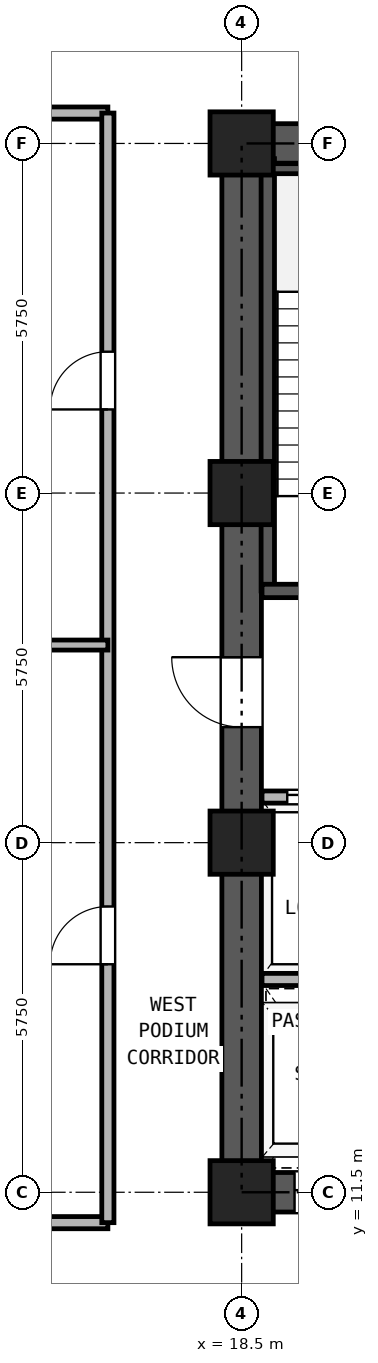
"""IFC4 building model, lengths in metres.
Left out: names, types, materials, properties, quantities, classifications, styles, units other than length and angle.
Written with IfcOpenShell. Run it as: python <this file> out.ifc"""

import sys

from ifc_helpers import new_model, si_unit, direction, frame, frame_2d, origin, origin_2d, place, context, subcontext, project, spatial, rectangle, hollow_rectangle, extrude, source, transform, mapped, element, fill, save


model = new_model("IFC4")
c1 = context("Model", 3, precision=1e-05, world=origin(), true_north=direction((0.0, 1.0)))
c2 = subcontext(c1, "Body", "Model", "MODEL_VIEW")
j1 = project(units=[si_unit("LENGTHUNIT", "METRE"), si_unit("PLANEANGLEUNIT", "RADIAN")], contexts=[c1])
p1 = place(None, origin())
s1 = spatial("IfcSite", under=j1, at=p1, CompositionType="ELEMENT")
p2 = place(p1, origin())
s2 = spatial("IfcBuilding", under=s1, at=p2, CompositionType="ELEMENT")
p3 = place(p2, frame((0.0, 0.0, 4.5)))
s3 = spatial("IfcBuildingStorey", under=s2, at=p3, CompositionType="ELEMENT", Elevation=4.5)
m1 = source(origin(), c2, "Body", "SweptSolid", [
    extrude(hollow_rectangle(XDim=1.04, YDim=1.04, WallThickness=0.065, at=origin_2d()), origin(), (0.0, 0.0, 1.0), 4.18),
])
for number, where, z_axis, x_axis in (
    (1, (18.5, 11.5, 0.0), (0.0, 0.0, 1.0), (1.0, 0.0, 0.0)),
    (2, (18.5, 17.25, 0.0), (0.0, 0.0, 1.0), (1.0, 0.0, 0.0)),
    (3, (18.5, 23.0, 0.0), (0.0, 0.0, 1.0), (1.0, 0.0, 0.0)),
    (4, (18.5, 28.75, 0.0), (0.0, 0.0, 1.0), (1.0, 0.0, 0.0)),
):
    element("IfcColumn", number, at=place(p3, frame(where, z_axis=z_axis, x_axis=x_axis)), inside=s3, PredefinedType="COLUMN", context=c2, shape_type="MappedRepresentation", body=[
        mapped(m1, transform((0.0, 0.0, 0.0), x_axis=(1.0, 0.0, 0.0), y_axis=(0.0, 1.0, 0.0), z_axis=(0.0, 0.0, 1.0), scale=1.0)),
    ])
p4 = place(p3, frame((18.175, 11.5, 0.0), z_axis=(0.0, 0.0, 1.0), x_axis=(1.0, 0.0, 0.0)))
e5 = element("IfcWall", 5, at=p4, inside=s3, PredefinedType="SHEAR", context=c2, shape_type="SweptSolid", body=[
    extrude(rectangle(XDim=10.65, YDim=0.65, at=frame_2d((5.325, 0.0))), origin(), (0.0, 0.0, 1.0), 4.18),
])
p5 = place(p4, frame((1.195, 0.0, 0.0)))
e6 = element("IfcOpeningElement", 6, at=p5, cuts=e5, PredefinedType="OPENING", context=c2, shape_type="SweptSolid", body=[
    extrude(rectangle(XDim=1.1, YDim=2.25, at=frame_2d((0.55, 1.125))), frame((0.0, 0.335, 0.0), z_axis=(0.0, -1.0, 0.0), x_axis=(1.0, 0.0, 0.0)), (0.0, 0.0, 1.0), 0.67),
])
p6 = place(p4, frame((3.495, 0.0, 0.0)))
e7 = element("IfcOpeningElement", 7, at=p6, cuts=e5, PredefinedType="OPENING", context=c2, shape_type="SweptSolid", body=[
    extrude(rectangle(XDim=1.1, YDim=2.25, at=frame_2d((0.55, 1.125))), frame((0.0, 0.335, 0.0), z_axis=(0.0, -1.0, 0.0), x_axis=(1.0, 0.0, 0.0)), (0.0, 0.0, 1.0), 0.67),
])
p7 = place(p4, frame((5.925, 0.0, 0.0)))
e8 = element("IfcOpeningElement", 8, at=p7, cuts=e5, PredefinedType="OPENING", context=c2, shape_type="SweptSolid", body=[
    extrude(rectangle(XDim=1.1, YDim=2.25, at=frame_2d((0.55, 1.125))), frame((0.0, 0.335, 0.0), z_axis=(0.0, -1.0, 0.0), x_axis=(1.0, 0.0, 0.0)), (0.0, 0.0, 1.0), 0.67),
])
p8 = place(p4, frame((8.325, 0.0, 0.0)))
e9 = element("IfcOpeningElement", 9, at=p8, cuts=e5, PredefinedType="OPENING", context=c2, shape_type="SweptSolid", body=[
    extrude(rectangle(XDim=1.1, YDim=2.25, at=frame_2d((0.55, 1.125))), frame((0.0, 0.335, 0.0), z_axis=(0.0, -1.0, 0.0), x_axis=(1.0, 0.0, 0.0)), (0.0, 0.0, 1.0), 0.67),
])
p9 = place(p3, frame((18.175, 28.75, 0.0), z_axis=(0.0, 0.0, 1.0), x_axis=(1.0, 0.0, 0.0)))
e10 = element("IfcWall", 10, at=p9, inside=s3, PredefinedType="SHEAR", context=c2, shape_type="SweptSolid", body=[
    extrude(rectangle(XDim=10.65, YDim=0.65, at=frame_2d((5.325, 0.0))), origin(), (0.0, 0.0, 1.0), 4.18),
])
p10 = place(p9, frame((4.205, 0.0, 0.0)))
e11 = element("IfcOpeningElement", 11, at=p10, cuts=e10, PredefinedType="OPENING", context=c2, shape_type="SweptSolid", body=[
    extrude(rectangle(XDim=0.9, YDim=2.05, at=frame_2d((0.45, 1.025))), frame((0.0, 0.335, 0.0), z_axis=(0.0, -1.0, 0.0), x_axis=(1.0, 0.0, 0.0)), (0.0, 0.0, 1.0), 0.67),
])
p11 = place(p9, frame((5.745, 0.0, 0.0)))
e12 = element("IfcOpeningElement", 12, at=p11, cuts=e10, PredefinedType="OPENING", context=c2, shape_type="SweptSolid", body=[
    extrude(rectangle(XDim=0.9, YDim=2.05, at=frame_2d((0.45, 1.025))), frame((0.0, 0.335, 0.0), z_axis=(0.0, -1.0, 0.0), x_axis=(1.0, 0.0, 0.0)), (0.0, 0.0, 1.0), 0.67),
])
p12 = place(p3, frame((18.5, 11.825, 0.0), z_axis=(0.0, 0.0, 1.0), x_axis=(0.0, 1.0, 0.0)))
e13 = element("IfcWall", 13, at=p12, inside=s3, PredefinedType="SHEAR", context=c2, shape_type="SweptSolid", body=[
    extrude(rectangle(XDim=16.6, YDim=0.65, at=frame_2d((8.3, 0.0))), origin(), (0.0, 0.0, 1.0), 4.18),
])
p13 = place(p12, frame((7.325, 0.0, 0.0)))
e14 = element("IfcOpeningElement", 14, at=p13, cuts=e13, PredefinedType="OPENING", context=c2, shape_type="SweptSolid", body=[
    extrude(rectangle(XDim=1.15, YDim=2.2, at=frame_2d((0.575, 1.1))), frame((0.0, 0.335, 0.0), z_axis=(0.0, -1.0, 0.0), x_axis=(1.0, 0.0, 0.0)), (0.0, 0.0, 1.0), 0.67),
])
p14 = place(p3, frame((18.93, 21.39, 0.0), z_axis=(0.0, 0.0, 1.0), x_axis=(0.0, 1.0, 0.0)))
e15 = element("IfcWall", 15, at=p14, inside=s3, PredefinedType="SOLIDWALL", context=c2, shape_type="SweptSolid", body=[
    extrude(rectangle(XDim=7.11, YDim=0.22, at=frame_2d((3.555, 0.0))), origin(), (0.0, 0.0, 1.0), 4.18),
])
p15 = place(p3, frame((18.835, 28.335, 0.0), z_axis=(0.0, 0.0, 1.0), x_axis=(1.0, 0.0, 0.0)))
e16 = element("IfcWall", 16, at=p15, inside=s3, PredefinedType="PARTITIONING", context=c2, shape_type="SweptSolid", body=[
    extrude(rectangle(XDim=3.275, YDim=0.165, at=frame_2d((1.638, 0.0))), origin(), (0.0, 0.0, 1.0), 4.18),
])
p16 = place(p3, frame((18.835, 21.39, 0.0), z_axis=(0.0, 0.0, 1.0), x_axis=(1.0, 0.0, 0.0)))
e17 = element("IfcWall", 17, at=p16, inside=s3, PredefinedType="SOLIDWALL", context=c2, shape_type="SweptSolid", body=[
    extrude(rectangle(XDim=6.295, YDim=0.22, at=frame_2d((3.147, 0.0))), origin(), (0.0, 0.0, 1.0), 4.18),
])
p17 = place(p16, frame((1.015, 0.0, 0.0)))
e18 = element("IfcOpeningElement", 18, at=p17, cuts=e17, PredefinedType="OPENING", context=c2, shape_type="SweptSolid", body=[
    extrude(rectangle(XDim=1.15, YDim=2.2, at=frame_2d((0.575, 1.1))), frame((0.0, 0.12, 0.0), z_axis=(0.0, -1.0, 0.0), x_axis=(1.0, 0.0, 0.0)), (0.0, 0.0, 1.0), 0.24),
])
p18 = place(p16, frame((4.745, 0.0, 0.0)))
e19 = element("IfcOpeningElement", 19, at=p18, cuts=e17, PredefinedType="OPENING", context=c2, shape_type="SweptSolid", body=[
    extrude(rectangle(XDim=1.1, YDim=2.25, at=frame_2d((0.55, 1.125))), frame((0.0, 0.12, 0.0), z_axis=(0.0, -1.0, 0.0), x_axis=(1.0, 0.0, 0.0)), (0.0, 0.0, 1.0), 0.24),
])
p19 = place(p3, frame((18.835, 18.0, 0.0), z_axis=(0.0, 0.0, 1.0), x_axis=(1.0, 0.0, 0.0)))
e20 = element("IfcWall", 20, at=p19, inside=s3, PredefinedType="PARTITIONING", context=c2, shape_type="SweptSolid", body=[
    extrude(rectangle(XDim=9.33, YDim=0.2, at=frame_2d((4.665, 0.0))), origin(), (0.0, 0.0, 1.0), 4.18),
])
p20 = place(p19, frame((0.415, 0.0, 0.0)))
e21 = element("IfcOpeningElement", 21, at=p20, cuts=e20, PredefinedType="OPENING", context=c2, shape_type="SweptSolid", body=[
    extrude(rectangle(XDim=1.3, YDim=2.3, at=frame_2d((0.65, 1.15))), frame((0.0, 0.11, 0.0), z_axis=(0.0, -1.0, 0.0), x_axis=(1.0, 0.0, 0.0)), (0.0, 0.0, 1.0), 0.22),
])
p21 = place(p19, frame((2.515, 0.0, 0.0)))
e22 = element("IfcOpeningElement", 22, at=p21, cuts=e20, PredefinedType="OPENING", context=c2, shape_type="SweptSolid", body=[
    extrude(rectangle(XDim=1.3, YDim=2.3, at=frame_2d((0.65, 1.15))), frame((0.0, 0.11, 0.0), z_axis=(0.0, -1.0, 0.0), x_axis=(1.0, 0.0, 0.0)), (0.0, 0.0, 1.0), 0.22),
])
p22 = place(p19, frame((7.015, 0.0, 0.0)))
e23 = element("IfcOpeningElement", 23, at=p22, cuts=e20, PredefinedType="OPENING", context=c2, shape_type="SweptSolid", body=[
    extrude(rectangle(XDim=1.0, YDim=2.15, at=frame_2d((0.5, 1.075))), frame((0.0, 0.11, 0.0), z_axis=(0.0, -1.0, 0.0), x_axis=(1.0, 0.0, 0.0)), (0.0, 0.0, 1.0), 0.22),
])
p23 = place(p3, frame((18.835, 15.0, 0.0), z_axis=(0.0, 0.0, 1.0), x_axis=(1.0, 0.0, 0.0)))
e24 = element("IfcWall", 24, at=p23, inside=s3, PredefinedType="PARTITIONING", context=c2, shape_type="SweptSolid", body=[
    extrude(rectangle(XDim=9.33, YDim=0.2, at=frame_2d((4.665, 0.0))), origin(), (0.0, 0.0, 1.0), 4.18),
])
for number, where, z_axis, x_axis in (
    (25, (7.5, 11.0, 0.0), (0.0, 0.0, 1.0), (1.0, 0.0, 0.0)),
    (26, (7.5, 29.25, 0.0), (0.0, 0.0, 1.0), (1.0, 0.0, 0.0)),
):
    element("IfcWall", number, at=place(p3, frame(where, z_axis=z_axis, x_axis=x_axis)), inside=s3, PredefinedType="PARTITIONING", context=c2, shape_type="SweptSolid", body=[
        extrude(rectangle(XDim=8.8, YDim=0.2, at=frame_2d((4.4, 0.0))), origin(), (0.0, 0.0, 1.0), 4.18),
    ])
p24 = place(p3, frame((16.3, 11.0, 0.0), z_axis=(0.0, 0.0, 1.0), x_axis=(0.0, 1.0, 0.0)))
e27 = element("IfcWall", 27, at=p24, inside=s3, PredefinedType="PARTITIONING", context=c2, shape_type="SweptSolid", body=[
    extrude(rectangle(XDim=18.25, YDim=0.2, at=frame_2d((9.125, 0.0))), origin(), (0.0, 0.0, 1.0), 4.18),
])
p25 = place(p24, frame((4.25, 0.0, 0.0)))
e28 = element("IfcOpeningElement", 28, at=p25, cuts=e27, PredefinedType="OPENING", context=c2, shape_type="SweptSolid", body=[
    extrude(rectangle(XDim=0.95, YDim=2.15, at=frame_2d((0.475, 1.075))), frame((0.0, 0.11, 0.0), z_axis=(0.0, -1.0, 0.0), x_axis=(1.0, 0.0, 0.0)), (0.0, 0.0, 1.0), 0.22),
])
p26 = place(p24, frame((13.375, 0.0, 0.0)))
e29 = element("IfcOpeningElement", 29, at=p26, cuts=e27, PredefinedType="OPENING", context=c2, shape_type="SweptSolid", body=[
    extrude(rectangle(XDim=0.95, YDim=2.15, at=frame_2d((0.475, 1.075))), frame((0.0, 0.11, 0.0), z_axis=(0.0, -1.0, 0.0), x_axis=(1.0, 0.0, 0.0)), (0.0, 0.0, 1.0), 0.22),
])
p27 = place(p3, frame((0.25, 20.5, 0.0), z_axis=(0.0, 0.0, 1.0), x_axis=(1.0, 0.0, 0.0)))
e30 = element("IfcWall", 30, at=p27, inside=s3, PredefinedType="PARTITIONING", context=c2, shape_type="SweptSolid", body=[
    extrude(rectangle(XDim=16.05, YDim=0.165, at=frame_2d((8.025, 0.0))), origin(), (0.0, 0.0, 1.0), 4.18),
])
p28 = place(p20, origin())
e31 = element("IfcDoor", 31, at=p28, inside=s3, OperationType="DOUBLE_DOOR_SLIDING", PredefinedType="DOOR", context=c2, shape_type="SweptSolid", body=[
    extrude(rectangle(XDim=1.3, YDim=2.3, at=frame_2d((0.65, 1.15))), frame((0.0, 0.025, 0.0), z_axis=(0.0, -1.0, 0.0), x_axis=(1.0, 0.0, 0.0)), (0.0, 0.0, 1.0), 0.05),
])
fill(e21, e31)
p29 = place(p13, frame((1.15, 0.0, 0.0), z_axis=(0.0, 0.0, 1.0), x_axis=(-1.0, 0.0, 0.0)))
e32 = element("IfcDoor", 32, at=p29, inside=s3, OperationType="SINGLE_SWING_RIGHT", PredefinedType="DOOR", context=c2, shape_type="SweptSolid", body=[
    extrude(rectangle(XDim=1.15, YDim=2.2, at=frame_2d((0.575, 1.1))), frame((0.0, 0.025, 0.0), z_axis=(0.0, -1.0, 0.0), x_axis=(1.0, 0.0, 0.0)), (0.0, 0.0, 1.0), 0.05),
])
fill(e14, e32)
p30 = place(p5, frame((1.1, 0.0, 0.0), z_axis=(0.0, 0.0, 1.0), x_axis=(-1.0, 0.0, 0.0)))
e33 = element("IfcDoor", 33, at=p30, inside=s3, OperationType="DOUBLE_DOOR_SLIDING", PredefinedType="DOOR", context=c2, shape_type="SweptSolid", body=[
    extrude(rectangle(XDim=1.1, YDim=2.25, at=frame_2d((0.55, 1.125))), frame((0.0, 0.025, 0.0), z_axis=(0.0, -1.0, 0.0), x_axis=(1.0, 0.0, 0.0)), (0.0, 0.0, 1.0), 0.05),
])
fill(e6, e33)
p31 = place(p25, frame((0.95, 0.0, 0.0), z_axis=(0.0, 0.0, 1.0), x_axis=(-1.0, 0.0, 0.0)))
e34 = element("IfcDoor", 34, at=p31, inside=s3, OperationType="SINGLE_SWING_LEFT", PredefinedType="DOOR", context=c2, shape_type="SweptSolid", body=[
    extrude(rectangle(XDim=0.95, YDim=2.15, at=frame_2d((0.475, 1.075))), frame((0.0, 0.025, 0.0), z_axis=(0.0, -1.0, 0.0), x_axis=(1.0, 0.0, 0.0)), (0.0, 0.0, 1.0), 0.05),
])
fill(e28, e34)
p32 = place(p26, frame((0.95, 0.0, 0.0), z_axis=(0.0, 0.0, 1.0), x_axis=(-1.0, 0.0, 0.0)))
e35 = element("IfcDoor", 35, at=p32, inside=s3, OperationType="SINGLE_SWING_LEFT", PredefinedType="DOOR", context=c2, shape_type="SweptSolid", body=[
    extrude(rectangle(XDim=0.95, YDim=2.15, at=frame_2d((0.475, 1.075))), frame((0.0, 0.025, 0.0), z_axis=(0.0, -1.0, 0.0), x_axis=(1.0, 0.0, 0.0)), (0.0, 0.0, 1.0), 0.05),
])
fill(e29, e35)
save(model, sys.argv[1])
